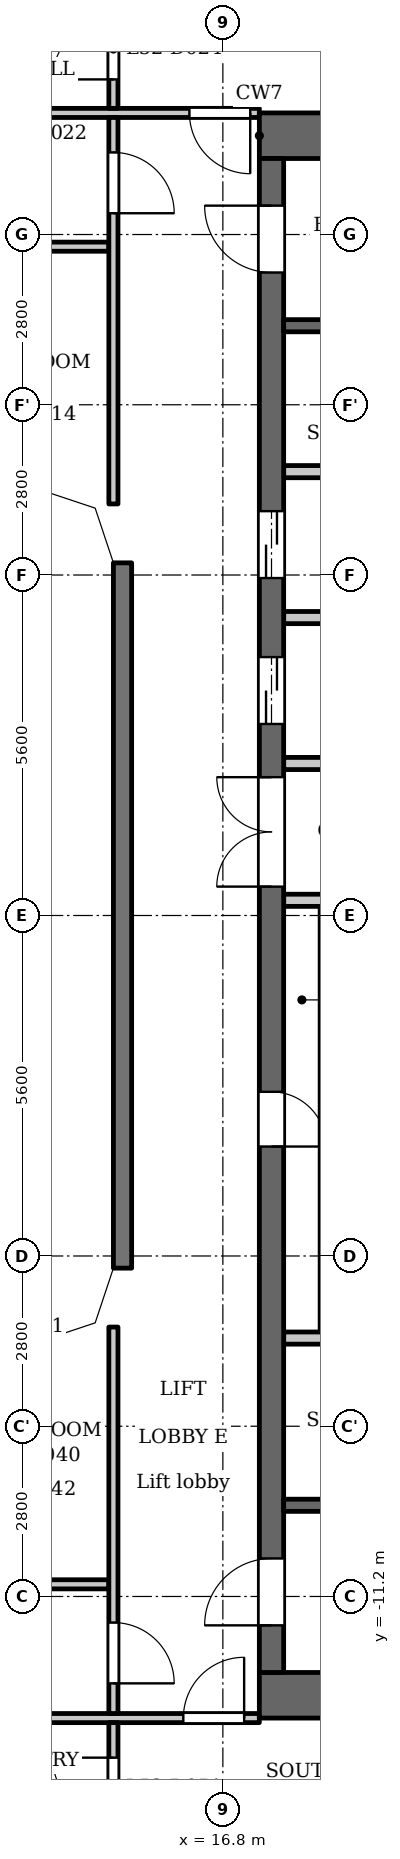
"""IFC4 building model, lengths in metres.
Left out: names, types, materials, properties, quantities, classifications, styles, units other than length and angle.
Written with IfcOpenShell. Run it as: python <this file> out.ifc"""

import sys

from ifc_helpers import new_model, si_unit, direction, frame, frame_2d, origin, place, context, subcontext, project, spatial, polyline, rectangle, outline, extrude, element, fill, save


model = new_model("IFC4")
c1 = context("Model", 3, precision=1e-05, world=origin(), true_north=direction((0.0, 1.0)))
c2 = subcontext(c1, "Body", "Model", "MODEL_VIEW")
j1 = project(units=[si_unit("LENGTHUNIT", "METRE"), si_unit("PLANEANGLEUNIT", "RADIAN")], contexts=[c1])
p1 = place(None, origin())
s1 = spatial("IfcSite", under=j1, at=p1, CompositionType="ELEMENT")
p2 = place(p1, origin())
s2 = spatial("IfcBuilding", under=s1, at=p2, CompositionType="ELEMENT")
p3 = place(p2, frame((0.0, 0.0, 202.9)))
s3 = spatial("IfcBuildingStorey", under=s2, at=p3, CompositionType="ELEMENT", Elevation=202.9)
p4 = place(p3, frame((15.15, 5.8, 0.0), z_axis=(0.0, 0.0, 1.0), x_axis=(0.0, -1.0, 0.0)))
e1 = element("IfcWall", 1, at=p4, inside=s3, PredefinedType="SOLIDWALL", context=c2, shape_type="SweptSolid", body=[
    extrude(rectangle(XDim=11.6, YDim=0.3, at=frame_2d((5.8, 0.0))), origin(), (0.0, 0.0, 1.0), 3.2),
])
for number, where, z_axis, x_axis in (
    (2, (17.4, 12.825, 0.0), (0.0, 0.0, 1.0), (1.0, 0.0, 0.0)),
    (3, (17.4, -12.825, 0.0), (0.0, 0.0, 1.0), (1.0, 0.0, 0.0)),
):
    element("IfcWall", number, at=place(p3, frame(where, z_axis=z_axis, x_axis=x_axis)), inside=s3, PredefinedType="SHEAR", context=c2, shape_type="SweptSolid", body=[
        extrude(rectangle(XDim=7.6, YDim=0.75, at=frame_2d((3.8, 0.0))), origin(), (0.0, 0.0, 1.0), 3.2),
    ])
p5 = place(p3, frame((17.6, -12.45, 0.0), z_axis=(0.0, 0.0, 1.0), x_axis=(0.0, 1.0, 0.0)))
e4 = element("IfcWall", 4, at=p5, inside=s3, PredefinedType="SHEAR", context=c2, shape_type="SweptSolid", body=[
    extrude(rectangle(XDim=24.9, YDim=0.4, at=frame_2d((12.45, 0.0))), origin(), (0.0, 0.0, 1.0), 3.2),
])
p6 = place(p5, frame((8.65, 0.0, 0.0)))
e5 = element("IfcOpeningElement", 5, at=p6, cuts=e4, PredefinedType="OPENING", context=c2, shape_type="SweptSolid", body=[
    extrude(rectangle(XDim=0.9, YDim=2.1, at=frame_2d((0.45, 1.05))), frame((0.0, 0.21, 0.0), z_axis=(0.0, -1.0, 0.0), x_axis=(1.0, 0.0, 0.0)), (0.0, 0.0, 1.0), 0.42),
])
p7 = place(p5, frame((15.6, 0.0, 0.0)))
e6 = element("IfcOpeningElement", 6, at=p7, cuts=e4, PredefinedType="OPENING", context=c2, shape_type="SweptSolid", body=[
    extrude(rectangle(XDim=1.1, YDim=2.1, at=frame_2d((0.55, 1.05))), frame((0.0, 0.21, 0.0), z_axis=(0.0, -1.0, 0.0), x_axis=(1.0, 0.0, 0.0)), (0.0, 0.0, 1.0), 0.42),
])
p8 = place(p5, frame((18.0, 0.0, 0.0)))
e7 = element("IfcOpeningElement", 7, at=p8, cuts=e4, PredefinedType="OPENING", context=c2, shape_type="SweptSolid", body=[
    extrude(rectangle(XDim=1.1, YDim=2.1, at=frame_2d((0.55, 1.05))), frame((0.0, 0.21, 0.0), z_axis=(0.0, -1.0, 0.0), x_axis=(1.0, 0.0, 0.0)), (0.0, 0.0, 1.0), 0.42),
])
p9 = place(p5, frame((23.025, 0.0, 0.0)))
e8 = element("IfcOpeningElement", 8, at=p9, cuts=e4, PredefinedType="OPENING", context=c2, shape_type="SweptSolid", body=[
    extrude(rectangle(XDim=1.1, YDim=2.1, at=frame_2d((0.55, 1.05))), frame((0.0, 0.21, 0.0), z_axis=(0.0, -1.0, 0.0), x_axis=(1.0, 0.0, 0.0)), (0.0, 0.0, 1.0), 0.42),
])
p10 = place(p5, frame((0.775, 0.0, 0.0)))
e9 = element("IfcOpeningElement", 9, at=p10, cuts=e4, PredefinedType="OPENING", context=c2, shape_type="SweptSolid", body=[
    extrude(rectangle(XDim=1.1, YDim=2.1, at=frame_2d((0.55, 1.05))), frame((0.0, 0.21, 0.0), z_axis=(0.0, -1.0, 0.0), x_axis=(1.0, 0.0, 0.0)), (0.0, 0.0, 1.0), 0.42),
])
p11 = place(p5, frame((12.925, 0.0, 0.0)))
e10 = element("IfcOpeningElement", 10, at=p11, cuts=e4, PredefinedType="OPENING", context=c2, shape_type="SweptSolid", body=[
    extrude(rectangle(XDim=1.8, YDim=2.1, at=frame_2d((0.9, 1.05))), frame((0.0, 0.21, 0.0), z_axis=(0.0, -1.0, 0.0), x_axis=(1.0, 0.0, 0.0)), (0.0, 0.0, 1.0), 0.42),
])
p12 = place(p3, frame((17.8, -9.7, 0.0), z_axis=(0.0, 0.0, 1.0), x_axis=(1.0, 0.0, 0.0)))
e11 = element("IfcWall", 11, at=p12, inside=s3, PredefinedType="SHEAR", context=c2, shape_type="SweptSolid", body=[
    extrude(rectangle(XDim=5.65, YDim=0.2, at=frame_2d((2.825, 0.0))), origin(), (0.0, 0.0, 1.0), 3.2),
])
p13 = place(p12, frame((0.85, 0.0, 0.0)))
e12 = element("IfcOpeningElement", 12, at=p13, cuts=e11, PredefinedType="OPENING", context=c2, shape_type="SweptSolid", body=[
    extrude(rectangle(XDim=1.1, YDim=2.1, at=frame_2d((0.55, 1.05))), frame((0.0, 0.11, 0.0), z_axis=(0.0, -1.0, 0.0), x_axis=(1.0, 0.0, 0.0)), (0.0, 0.0, 1.0), 0.22),
])
p14 = place(p12, frame((3.75, 0.0, 0.0)))
e13 = element("IfcOpeningElement", 13, at=p14, cuts=e11, PredefinedType="OPENING", context=c2, shape_type="SweptSolid", body=[
    extrude(rectangle(XDim=1.1, YDim=2.1, at=frame_2d((0.55, 1.05))), frame((0.0, 0.11, 0.0), z_axis=(0.0, -1.0, 0.0), x_axis=(1.0, 0.0, 0.0)), (0.0, 0.0, 1.0), 0.22),
])
p15 = place(p3, frame((17.8, -6.95, 0.0), z_axis=(0.0, 0.0, 1.0), x_axis=(1.0, 0.0, 0.0)))
e14 = element("IfcWall", 14, at=p15, inside=s3, PredefinedType="PARTITIONING", context=c2, shape_type="SweptSolid", body=[
    extrude(rectangle(XDim=2.8, YDim=0.2, at=frame_2d((1.4, 0.0))), origin(), (0.0, 0.0, 1.0), 3.2),
])
p16 = place(p3, frame((17.8, 0.25, 0.0), z_axis=(0.0, 0.0, 1.0), x_axis=(1.0, 0.0, 0.0)))
e15 = element("IfcWall", 15, at=p16, inside=s3, PredefinedType="PARTITIONING", context=c2, shape_type="SweptSolid", body=[
    extrude(rectangle(XDim=3.0, YDim=0.2, at=frame_2d((1.5, 0.0))), origin(), (0.0, 0.0, 1.0), 3.2),
])
p17 = place(p16, frame((1.35, 0.0, 0.0)))
e16 = element("IfcOpeningElement", 16, at=p17, cuts=e15, PredefinedType="OPENING", context=c2, shape_type="SweptSolid", body=[
    extrude(rectangle(XDim=0.9, YDim=2.1, at=frame_2d((0.45, 1.05))), frame((0.0, 0.11, 0.0), z_axis=(0.0, -1.0, 0.0), x_axis=(1.0, 0.0, 0.0)), (0.0, 0.0, 1.0), 0.22),
])
p18 = place(p3, frame((17.8, 2.5, 0.0), z_axis=(0.0, 0.0, 1.0), x_axis=(1.0, 0.0, 0.0)))
e17 = element("IfcWall", 17, at=p18, inside=s3, PredefinedType="PARTITIONING", context=c2, shape_type="SweptSolid", body=[
    extrude(rectangle(XDim=3.0, YDim=0.2, at=frame_2d((1.5, 0.0))), origin(), (0.0, 0.0, 1.0), 3.2),
])
for number, where, z_axis, x_axis in (
    (18, (17.8, 4.9, 0.0), (0.0, 0.0, 1.0), (1.0, 0.0, 0.0)),
    (19, (17.8, 7.3, 0.0), (0.0, 0.0, 1.0), (1.0, 0.0, 0.0)),
):
    element("IfcWall", number, at=place(p3, frame(where, z_axis=z_axis, x_axis=x_axis)), inside=s3, PredefinedType="PARTITIONING", context=c2, shape_type="SweptSolid", body=[
        extrude(rectangle(XDim=2.8, YDim=0.2, at=frame_2d((1.4, 0.0))), origin(), (0.0, 0.0, 1.0), 3.2),
    ])
p19 = place(p3, frame((17.8, 9.7, 0.0), z_axis=(0.0, 0.0, 1.0), x_axis=(1.0, 0.0, 0.0)))
e20 = element("IfcWall", 20, at=p19, inside=s3, PredefinedType="SHEAR", context=c2, shape_type="SweptSolid", body=[
    extrude(rectangle(XDim=5.65, YDim=0.2, at=frame_2d((2.825, 0.0))), origin(), (0.0, 0.0, 1.0), 3.2),
])
p20 = place(p19, frame((0.85, 0.0, 0.0)))
e21 = element("IfcOpeningElement", 21, at=p20, cuts=e20, PredefinedType="OPENING", context=c2, shape_type="SweptSolid", body=[
    extrude(rectangle(XDim=1.1, YDim=2.1, at=frame_2d((0.55, 1.05))), frame((0.0, 0.11, 0.0), z_axis=(0.0, -1.0, 0.0), x_axis=(1.0, 0.0, 0.0)), (0.0, 0.0, 1.0), 0.22),
])
p21 = place(p19, frame((3.75, 0.0, 0.0)))
e22 = element("IfcOpeningElement", 22, at=p21, cuts=e20, PredefinedType="OPENING", context=c2, shape_type="SweptSolid", body=[
    extrude(rectangle(XDim=1.1, YDim=2.1, at=frame_2d((0.55, 1.05))), frame((0.0, 0.11, 0.0), z_axis=(0.0, -1.0, 0.0), x_axis=(1.0, 0.0, 0.0)), (0.0, 0.0, 1.0), 0.22),
])
p22 = place(p3, frame((-17.4, -13.2, 0.0), z_axis=(0.0, 0.0, 1.0), x_axis=(1.0, 0.0, 0.0)))
e23 = element("IfcWall", 23, at=p22, inside=s3, PredefinedType="PARTITIONING", context=c2, shape_type="SweptSolid", body=[
    extrude(rectangle(XDim=34.8, YDim=0.15, at=frame_2d((17.4, 0.0))), origin(), (0.0, 0.0, 1.0), 3.2),
])
p23 = place(p22, frame((0.15, 0.0, 0.0)))
e24 = element("IfcOpeningElement", 24, at=p23, cuts=e23, PredefinedType="OPENING", context=c2, shape_type="SweptSolid", body=[
    extrude(rectangle(XDim=1.0, YDim=2.1, at=frame_2d((0.5, 1.05))), frame((0.0, 0.085, 0.0), z_axis=(0.0, -1.0, 0.0), x_axis=(1.0, 0.0, 0.0)), (0.0, 0.0, 1.0), 0.17),
])
p24 = place(p22, frame((33.55, 0.0, 0.0)))
e25 = element("IfcOpeningElement", 25, at=p24, cuts=e23, PredefinedType="OPENING", context=c2, shape_type="SweptSolid", body=[
    extrude(rectangle(XDim=1.0, YDim=2.1, at=frame_2d((0.5, 1.05))), frame((0.0, 0.085, 0.0), z_axis=(0.0, -1.0, 0.0), x_axis=(1.0, 0.0, 0.0)), (0.0, 0.0, 1.0), 0.17),
])
p25 = place(p3, frame((-14.925, -11.0, 0.0), z_axis=(0.0, 0.0, 1.0), x_axis=(1.0, 0.0, 0.0)))
e26 = element("IfcWall", 26, at=p25, inside=s3, PredefinedType="PARTITIONING", context=c2, shape_type="SweptSolid", body=[
    extrude(rectangle(XDim=29.85, YDim=0.15, at=frame_2d((14.925, 0.0))), origin(), (0.0, 0.0, 1.0), 3.2),
])
p26 = place(p25, frame((2.575, 0.0, 0.0)))
e27 = element("IfcOpeningElement", 27, at=p26, cuts=e26, PredefinedType="OPENING", context=c2, shape_type="SweptSolid", body=[
    extrude(rectangle(XDim=1.0, YDim=2.1, at=frame_2d((0.5, 1.05))), frame((0.0, 0.085, 0.0), z_axis=(0.0, -1.0, 0.0), x_axis=(1.0, 0.0, 0.0)), (0.0, 0.0, 1.0), 0.17),
])
p27 = place(p25, frame((26.375, 0.0, 0.0)))
e28 = element("IfcOpeningElement", 28, at=p27, cuts=e26, PredefinedType="OPENING", context=c2, shape_type="SweptSolid", body=[
    extrude(rectangle(XDim=1.0, YDim=2.1, at=frame_2d((0.5, 1.05))), frame((0.0, 0.085, 0.0), z_axis=(0.0, -1.0, 0.0), x_axis=(1.0, 0.0, 0.0)), (0.0, 0.0, 1.0), 0.17),
])
p28 = place(p3, frame((-14.925, 11.0, 0.0), z_axis=(0.0, 0.0, 1.0), x_axis=(1.0, 0.0, 0.0)))
e29 = element("IfcWall", 29, at=p28, inside=s3, PredefinedType="PARTITIONING", context=c2, shape_type="SweptSolid", body=[
    extrude(rectangle(XDim=29.85, YDim=0.15, at=frame_2d((14.925, 0.0))), origin(), (0.0, 0.0, 1.0), 3.2),
])
p29 = place(p28, frame((2.475, 0.0, 0.0)))
e30 = element("IfcOpeningElement", 30, at=p29, cuts=e29, PredefinedType="OPENING", context=c2, shape_type="SweptSolid", body=[
    extrude(rectangle(XDim=1.0, YDim=2.1, at=frame_2d((0.5, 1.05))), frame((0.0, 0.085, 0.0), z_axis=(0.0, -1.0, 0.0), x_axis=(1.0, 0.0, 0.0)), (0.0, 0.0, 1.0), 0.17),
])
p30 = place(p28, frame((17.975, 0.0, 0.0)))
e31 = element("IfcOpeningElement", 31, at=p30, cuts=e29, PredefinedType="OPENING", context=c2, shape_type="SweptSolid", body=[
    extrude(rectangle(XDim=1.0, YDim=2.1, at=frame_2d((0.5, 1.05))), frame((0.0, 0.085, 0.0), z_axis=(0.0, -1.0, 0.0), x_axis=(1.0, 0.0, 0.0)), (0.0, 0.0, 1.0), 0.17),
])
p31 = place(p3, frame((-17.4, 13.2, 0.0), z_axis=(0.0, 0.0, 1.0), x_axis=(1.0, 0.0, 0.0)))
e32 = element("IfcWall", 32, at=p31, inside=s3, PredefinedType="PARTITIONING", context=c2, shape_type="SweptSolid", body=[
    extrude(rectangle(XDim=34.8, YDim=0.15, at=frame_2d((17.4, 0.0))), origin(), (0.0, 0.0, 1.0), 3.2),
])
p32 = place(p31, frame((0.25, 0.0, 0.0)))
e33 = element("IfcOpeningElement", 33, at=p32, cuts=e32, PredefinedType="OPENING", context=c2, shape_type="SweptSolid", body=[
    extrude(rectangle(XDim=1.0, YDim=2.1, at=frame_2d((0.5, 1.05))), frame((0.0, 0.085, 0.0), z_axis=(0.0, -1.0, 0.0), x_axis=(1.0, 0.0, 0.0)), (0.0, 0.0, 1.0), 0.17),
])
p33 = place(p31, frame((33.65, 0.0, 0.0)))
e34 = element("IfcOpeningElement", 34, at=p33, cuts=e32, PredefinedType="OPENING", context=c2, shape_type="SweptSolid", body=[
    extrude(rectangle(XDim=1.0, YDim=2.1, at=frame_2d((0.5, 1.05))), frame((0.0, 0.085, 0.0), z_axis=(0.0, -1.0, 0.0), x_axis=(1.0, 0.0, 0.0)), (0.0, 0.0, 1.0), 0.17),
])
p34 = place(p3, frame((15.0, -15.325, 0.0), z_axis=(0.0, 0.0, 1.0), x_axis=(0.0, 1.0, 0.0)))
e35 = element("IfcWall", 35, at=p34, inside=s3, PredefinedType="PARTITIONING", context=c2, shape_type="SweptSolid", body=[
    extrude(rectangle(XDim=2.05, YDim=0.15, at=frame_2d((1.025, 0.0))), origin(), (0.0, 0.0, 1.0), 3.2),
])
p35 = place(p34, frame((0.474, 0.0, 0.0)))
e36 = element("IfcOpeningElement", 36, at=p35, cuts=e35, PredefinedType="OPENING", context=c2, shape_type="SweptSolid", body=[
    extrude(rectangle(XDim=1.0, YDim=2.1, at=frame_2d((0.5, 1.05))), frame((0.0, 0.085, 0.0), z_axis=(0.0, -1.0, 0.0), x_axis=(1.0, 0.0, 0.0)), (0.0, 0.0, 1.0), 0.17),
])
p36 = place(p3, frame((15.0, -13.125, 0.0), z_axis=(0.0, 0.0, 1.0), x_axis=(0.0, 1.0, 0.0)))
e37 = element("IfcWall", 37, at=p36, inside=s3, PredefinedType="PARTITIONING", context=c2, shape_type="SweptSolid", body=[
    extrude(rectangle(XDim=6.356, YDim=0.15, at=frame_2d((3.178, 0.0))), origin(), (0.0, 0.0, 1.0), 3.2),
])
p37 = place(p36, frame((0.496, 0.0, 0.0)))
e38 = element("IfcOpeningElement", 38, at=p37, cuts=e37, PredefinedType="OPENING", context=c2, shape_type="SweptSolid", body=[
    extrude(rectangle(XDim=1.0, YDim=2.1, at=frame_2d((0.5, 1.05))), frame((0.0, 0.085, 0.0), z_axis=(0.0, -1.0, 0.0), x_axis=(1.0, 0.0, 0.0)), (0.0, 0.0, 1.0), 0.17),
])
p38 = place(p3, frame((15.0, 6.769, 0.0), z_axis=(0.0, 0.0, 1.0), x_axis=(0.0, 1.0, 0.0)))
e39 = element("IfcWall", 39, at=p38, inside=s3, PredefinedType="PARTITIONING", context=c2, shape_type="SweptSolid", body=[
    extrude(rectangle(XDim=6.356, YDim=0.15, at=frame_2d((3.178, 0.0))), origin(), (0.0, 0.0, 1.0), 3.2),
])
p39 = place(p38, frame((4.781, 0.0, 0.0)))
e40 = element("IfcOpeningElement", 40, at=p39, cuts=e39, PredefinedType="OPENING", context=c2, shape_type="SweptSolid", body=[
    extrude(rectangle(XDim=1.0, YDim=2.1, at=frame_2d((0.5, 1.05))), frame((0.0, 0.085, 0.0), z_axis=(0.0, -1.0, 0.0), x_axis=(1.0, 0.0, 0.0)), (0.0, 0.0, 1.0), 0.17),
])
p40 = place(p3, frame((15.0, 13.275, 0.0), z_axis=(0.0, 0.0, 1.0), x_axis=(0.0, 1.0, 0.0)))
e41 = element("IfcWall", 41, at=p40, inside=s3, PredefinedType="PARTITIONING", context=c2, shape_type="SweptSolid", body=[
    extrude(rectangle(XDim=2.05, YDim=0.15, at=frame_2d((1.025, 0.0))), origin(), (0.0, 0.0, 1.0), 3.2),
])
p41 = place(p40, frame((0.476, 0.0, 0.0)))
e42 = element("IfcOpeningElement", 42, at=p41, cuts=e41, PredefinedType="OPENING", context=c2, shape_type="SweptSolid", body=[
    extrude(rectangle(XDim=1.0, YDim=2.1, at=frame_2d((0.5, 1.05))), frame((0.0, 0.085, 0.0), z_axis=(0.0, -1.0, 0.0), x_axis=(1.0, 0.0, 0.0)), (0.0, 0.0, 1.0), 0.17),
])
p42 = place(p3, origin())
e43 = element("IfcWall", 43, at=p42, inside=s3, PredefinedType="SOLIDWALL", context=c2, shape_type="SweptSolid", body=[
    extrude(outline(polyline([(14.937, 6.937), (13.849, 7.3), (13.8, 7.3), (13.8, 7.0), (14.7, 6.7), (15.0, 5.8), (15.3, 5.8), (15.3, 5.849), (14.937, 6.937)])), origin(), (0.0, 0.0, 1.0), 3.2),
])
e44 = element("IfcWall", 44, at=p42, inside=s3, PredefinedType="SOLIDWALL", context=c2, shape_type="SweptSolid", body=[
    extrude(outline(polyline([(14.937, -6.937), (15.3, -5.849), (15.3, -5.8), (15.0, -5.8), (14.7, -6.7), (13.8, -7.0), (13.8, -7.3), (13.849, -7.3), (14.937, -6.937)])), origin(), (0.0, 0.0, 1.0), 3.2),
])
p43 = place(p6, origin())
e45 = element("IfcDoor", 45, at=p43, inside=s3, OperationType="SINGLE_SWING_LEFT", PredefinedType="DOOR", context=c2, shape_type="SweptSolid", body=[
    extrude(rectangle(XDim=0.9, YDim=2.1, at=frame_2d((0.45, 1.05))), frame((0.0, 0.025, 0.0), z_axis=(0.0, -1.0, 0.0), x_axis=(1.0, 0.0, 0.0)), (0.0, 0.0, 1.0), 0.05),
])
fill(e5, e45)
p44 = place(p7, origin())
e46 = element("IfcDoor", 46, at=p44, inside=s3, OperationType="DOUBLE_DOOR_SLIDING", PredefinedType="DOOR", context=c2, shape_type="SweptSolid", body=[
    extrude(rectangle(XDim=1.1, YDim=2.1, at=frame_2d((0.55, 1.05))), frame((0.0, 0.025, 0.0), z_axis=(0.0, -1.0, 0.0), x_axis=(1.0, 0.0, 0.0)), (0.0, 0.0, 1.0), 0.05),
])
fill(e6, e46)
p45 = place(p8, origin())
e47 = element("IfcDoor", 47, at=p45, inside=s3, OperationType="DOUBLE_DOOR_SLIDING", PredefinedType="DOOR", context=c2, shape_type="SweptSolid", body=[
    extrude(rectangle(XDim=1.1, YDim=2.1, at=frame_2d((0.55, 1.05))), frame((0.0, 0.025, 0.0), z_axis=(0.0, -1.0, 0.0), x_axis=(1.0, 0.0, 0.0)), (0.0, 0.0, 1.0), 0.05),
])
fill(e7, e47)
p46 = place(p9, origin())
e48 = element("IfcDoor", 48, at=p46, inside=s3, OperationType="SINGLE_SWING_LEFT", PredefinedType="DOOR", context=c2, shape_type="SweptSolid", body=[
    extrude(rectangle(XDim=1.1, YDim=2.1, at=frame_2d((0.55, 1.05))), frame((0.0, 0.025, 0.0), z_axis=(0.0, -1.0, 0.0), x_axis=(1.0, 0.0, 0.0)), (0.0, 0.0, 1.0), 0.05),
])
fill(e8, e48)
p47 = place(p10, origin())
e49 = element("IfcDoor", 49, at=p47, inside=s3, OperationType="SINGLE_SWING_RIGHT", PredefinedType="DOOR", context=c2, shape_type="SweptSolid", body=[
    extrude(rectangle(XDim=1.1, YDim=2.1, at=frame_2d((0.55, 1.05))), frame((0.0, 0.025, 0.0), z_axis=(0.0, -1.0, 0.0), x_axis=(1.0, 0.0, 0.0)), (0.0, 0.0, 1.0), 0.05),
])
fill(e9, e49)
p48 = place(p11, origin())
e50 = element("IfcDoor", 50, at=p48, inside=s3, OperationType="DOUBLE_DOOR_SINGLE_SWING", PredefinedType="DOOR", context=c2, shape_type="SweptSolid", body=[
    extrude(rectangle(XDim=1.8, YDim=2.1, at=frame_2d((0.9, 1.05))), frame((0.0, 0.025, 0.0), z_axis=(0.0, -1.0, 0.0), x_axis=(1.0, 0.0, 0.0)), (0.0, 0.0, 1.0), 0.05),
])
fill(e10, e50)
p49 = place(p39, origin())
e51 = element("IfcDoor", 51, at=p49, inside=s3, OperationType="SINGLE_SWING_LEFT", PredefinedType="DOOR", context=c2, shape_type="SweptSolid", body=[
    extrude(rectangle(XDim=1.0, YDim=2.1, at=frame_2d((0.5, 1.05))), frame((0.0, 0.025, 0.0), z_axis=(0.0, -1.0, 0.0), x_axis=(1.0, 0.0, 0.0)), (0.0, 0.0, 1.0), 0.05),
])
fill(e40, e51)
p50 = place(p33, origin())
e52 = element("IfcDoor", 52, at=p50, inside=s3, OperationType="SINGLE_SWING_RIGHT", PredefinedType="DOOR", context=c2, shape_type="SweptSolid", body=[
    extrude(rectangle(XDim=1.0, YDim=2.1, at=frame_2d((0.5, 1.05))), frame((0.0, 0.025, 0.0), z_axis=(0.0, -1.0, 0.0), x_axis=(1.0, 0.0, 0.0)), (0.0, 0.0, 1.0), 0.05),
])
fill(e34, e52)
p51 = place(p37, origin())
e53 = element("IfcDoor", 53, at=p51, inside=s3, OperationType="SINGLE_SWING_LEFT", PredefinedType="DOOR", context=c2, shape_type="SweptSolid", body=[
    extrude(rectangle(XDim=1.0, YDim=2.1, at=frame_2d((0.5, 1.05))), frame((0.0, 0.025, 0.0), z_axis=(0.0, -1.0, 0.0), x_axis=(1.0, 0.0, 0.0)), (0.0, 0.0, 1.0), 0.05),
])
fill(e38, e53)
p52 = place(p24, origin())
e54 = element("IfcDoor", 54, at=p52, inside=s3, OperationType="SINGLE_SWING_LEFT", PredefinedType="DOOR", context=c2, shape_type="SweptSolid", body=[
    extrude(rectangle(XDim=1.0, YDim=2.1, at=frame_2d((0.5, 1.05))), frame((0.0, 0.025, 0.0), z_axis=(0.0, -1.0, 0.0), x_axis=(1.0, 0.0, 0.0)), (0.0, 0.0, 1.0), 0.05),
])
fill(e25, e54)
p53 = place(p41, origin())
e55 = element("IfcDoor", 55, at=p53, inside=s3, OperationType="SINGLE_SWING_RIGHT", PredefinedType="DOOR", context=c2, shape_type="SweptSolid", body=[
    extrude(rectangle(XDim=1.0, YDim=2.1, at=frame_2d((0.5, 1.05))), frame((0.0, 0.025, 0.0), z_axis=(0.0, -1.0, 0.0), x_axis=(1.0, 0.0, 0.0)), (0.0, 0.0, 1.0), 0.05),
])
fill(e42, e55)
p54 = place(p35, origin())
e56 = element("IfcDoor", 56, at=p54, inside=s3, OperationType="SINGLE_SWING_LEFT", PredefinedType="DOOR", context=c2, shape_type="SweptSolid", body=[
    extrude(rectangle(XDim=1.0, YDim=2.1, at=frame_2d((0.5, 1.05))), frame((0.0, 0.025, 0.0), z_axis=(0.0, -1.0, 0.0), x_axis=(1.0, 0.0, 0.0)), (0.0, 0.0, 1.0), 0.05),
])
fill(e36, e56)
save(model, sys.argv[1])
